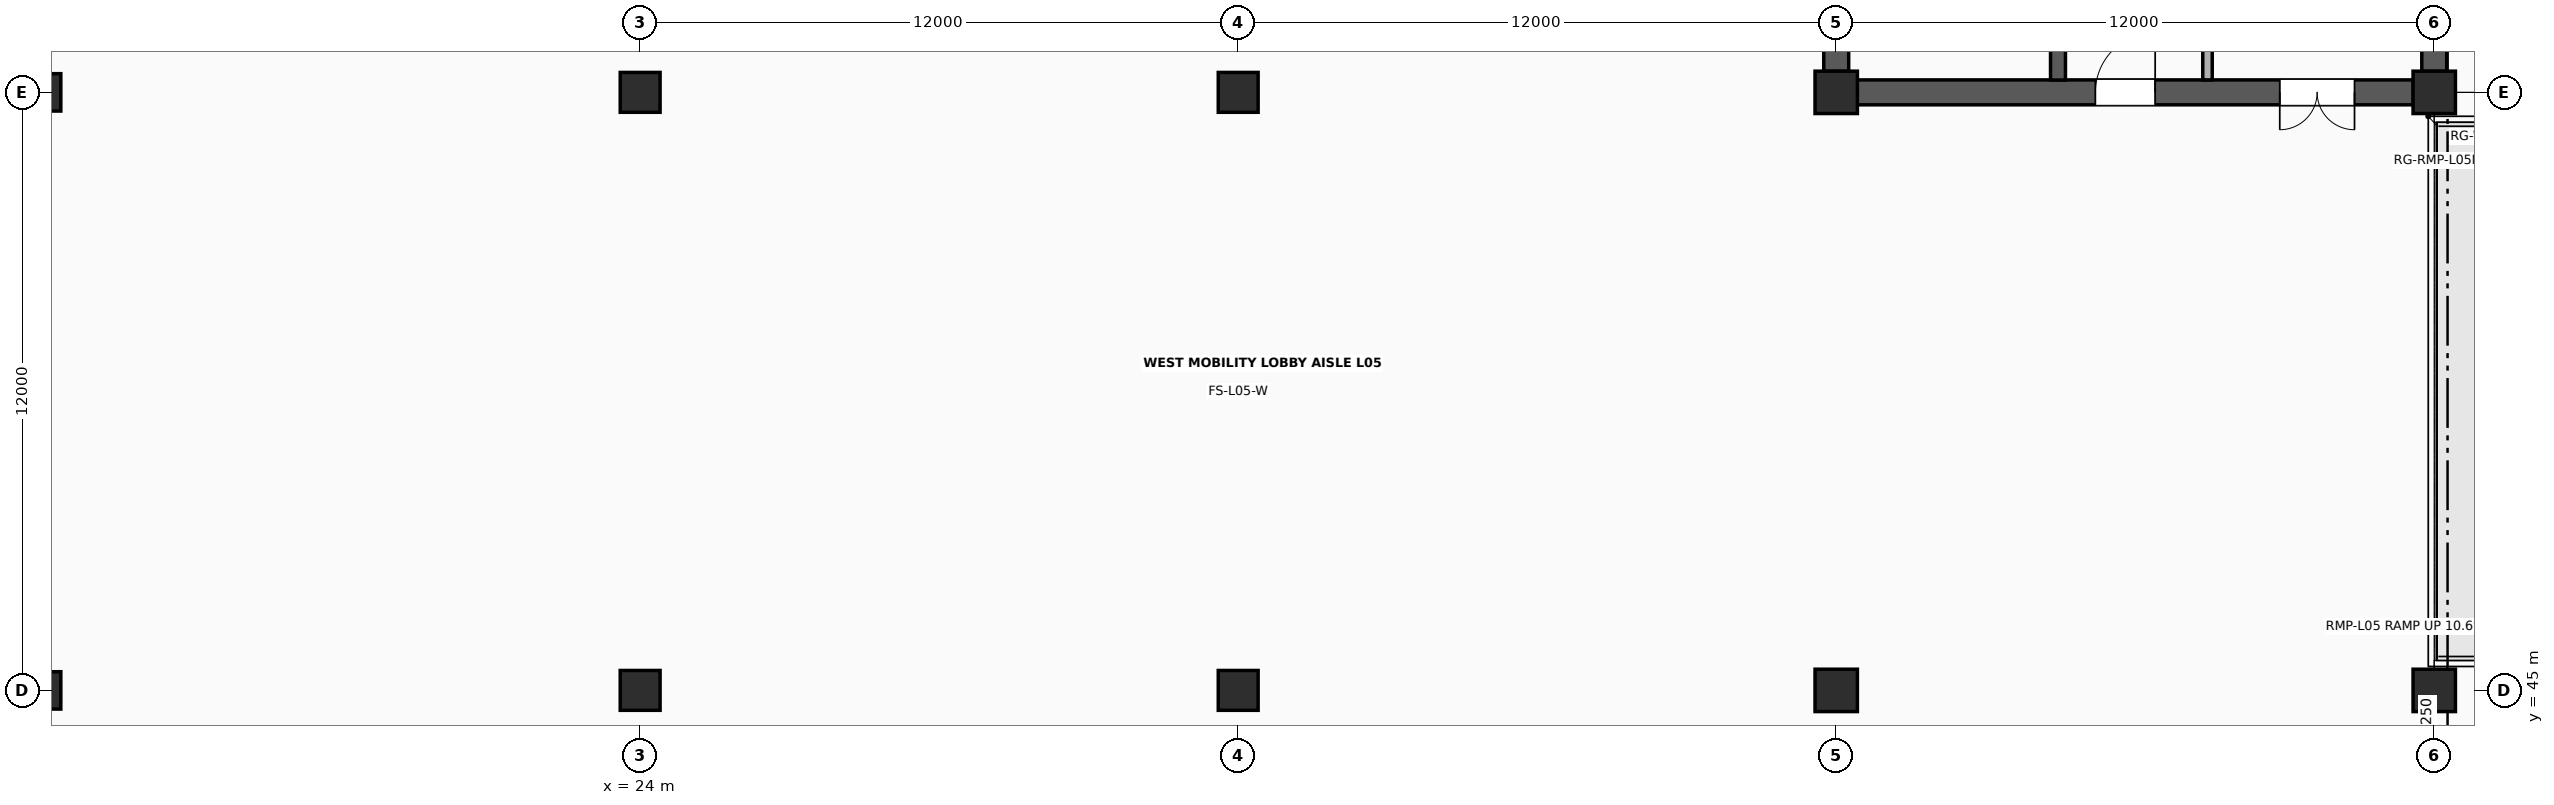
"""IFC4 building model, lengths in metres.
Left out: names, types, materials, properties, quantities, classifications, styles, units other than length and angle.
Written with IfcOpenShell. Run it as: python <this file> out.ifc"""

import sys

from ifc_helpers import new_model, si_unit, direction, frame, frame_2d, origin, origin_2d, place, context, subcontext, project, spatial, rectangle, extrude, element, fill, save


model = new_model("IFC4")
c1 = context("Model", 3, precision=1e-05, world=origin(), true_north=direction((0.0, 1.0)))
c2 = subcontext(c1, "Body", "Model", "MODEL_VIEW")
j1 = project(units=[si_unit("LENGTHUNIT", "METRE"), si_unit("PLANEANGLEUNIT", "RADIAN")], contexts=[c1])
p1 = place(None, origin())
s1 = spatial("IfcSite", under=j1, at=p1, CompositionType="ELEMENT")
p2 = place(p1, origin())
s2 = spatial("IfcBuilding", under=s1, at=p2, CompositionType="ELEMENT")
p3 = place(p2, frame((0.0, 0.0, 21.0)))
s3 = spatial("IfcBuildingStorey", under=s2, at=p3, CompositionType="ELEMENT", Elevation=21.0)
for number, where, z_axis, x_axis in (
    (1, (12.0, 45.0, 0.0), (0.0, 0.0, 1.0), (1.0, 0.0, 0.0)),
    (2, (12.0, 57.0, 0.0), (0.0, 0.0, 1.0), (1.0, 0.0, 0.0)),
):
    element("IfcColumn", number, at=place(p3, frame(where, z_axis=z_axis, x_axis=x_axis)), inside=s3, PredefinedType="COLUMN", context=c2, shape_type="SweptSolid", body=[
        extrude(rectangle(XDim=0.75, YDim=0.75, at=origin_2d()), origin(), (0.0, 0.0, 1.0), 3.8),
    ])
for number, where, z_axis, x_axis in (
    (3, (24.0, 45.0, 0.0), (0.0, 0.0, 1.0), (1.0, 0.0, 0.0)),
    (4, (24.0, 57.0, 0.0), (0.0, 0.0, 1.0), (1.0, 0.0, 0.0)),
    (5, (36.0, 45.0, 0.0), (0.0, 0.0, 1.0), (1.0, 0.0, 0.0)),
    (6, (36.0, 57.0, 0.0), (0.0, 0.0, 1.0), (1.0, 0.0, 0.0)),
):
    element("IfcColumn", number, at=place(p3, frame(where, z_axis=z_axis, x_axis=x_axis)), inside=s3, PredefinedType="COLUMN", context=c2, shape_type="SweptSolid", body=[
        extrude(rectangle(XDim=0.8, YDim=0.8, at=origin_2d()), origin(), (0.0, 0.0, 1.0), 3.8),
    ])
for number, where, z_axis, x_axis in (
    (7, (48.0, 45.0, 0.0), (0.0, 0.0, 1.0), (1.0, 0.0, 0.0)),
    (8, (48.0, 57.0, 0.0), (0.0, 0.0, 1.0), (1.0, 0.0, 0.0)),
    (9, (60.0, 45.0, 0.0), (0.0, 0.0, 1.0), (1.0, 0.0, 0.0)),
    (10, (60.0, 57.0, 0.0), (0.0, 0.0, 1.0), (1.0, 0.0, 0.0)),
):
    element("IfcColumn", number, at=place(p3, frame(where, z_axis=z_axis, x_axis=x_axis)), inside=s3, PredefinedType="COLUMN", context=c2, shape_type="SweptSolid", body=[
        extrude(rectangle(XDim=0.85, YDim=0.85, at=origin_2d()), origin(), (0.0, 0.0, 1.0), 3.8),
    ])
p4 = place(p3, frame((48.422, 57.0, 0.0), z_axis=(0.0, 0.0, 1.0), x_axis=(1.0, 0.0, 0.0)))
e11 = element("IfcWall", 11, at=p4, inside=s3, PredefinedType="SHEAR", context=c2, shape_type="SweptSolid", body=[
    extrude(rectangle(XDim=11.156, YDim=0.5, at=frame_2d((5.578, 0.0))), origin(), (0.0, 0.0, 1.0), 3.638),
])
p5 = place(p4, frame((4.778, 0.0, 0.0)))
e12 = element("IfcOpeningElement", 12, at=p5, cuts=e11, PredefinedType="OPENING", context=c2, shape_type="SweptSolid", body=[
    extrude(rectangle(XDim=1.2, YDim=2.2, at=frame_2d((0.6, 1.1))), frame((0.0, 0.265, 0.0), z_axis=(0.0, -1.0, 0.0), x_axis=(1.0, 0.0, 0.0)), (0.0, 0.0, 1.0), 0.53),
])
p6 = place(p4, frame((8.478, 0.0, 0.0)))
e13 = element("IfcOpeningElement", 13, at=p6, cuts=e11, PredefinedType="OPENING", context=c2, shape_type="SweptSolid", body=[
    extrude(rectangle(XDim=1.5, YDim=2.25, at=frame_2d((0.75, 1.125))), frame((0.0, 0.265, 0.0), z_axis=(0.0, -1.0, 0.0), x_axis=(1.0, 0.0, 0.0)), (0.0, 0.0, 1.0), 0.53),
])
for number, where, z_axis, x_axis in (
    (14, (48.0, 57.422, 0.0), (0.0, 0.0, 1.0), (0.0, 1.0, 0.0)),
    (15, (60.0, 57.422, 0.0), (0.0, 0.0, 1.0), (0.0, 1.0, 0.0)),
):
    element("IfcWall", number, at=place(p3, frame(where, z_axis=z_axis, x_axis=x_axis)), inside=s3, PredefinedType="SHEAR", context=c2, shape_type="SweptSolid", body=[
        extrude(rectangle(XDim=11.156, YDim=0.5, at=frame_2d((5.578, 0.0))), origin(), (0.0, 0.0, 1.0), 3.638),
    ])
p7 = place(p3, frame((52.45, 57.247, 0.0), z_axis=(0.0, 0.0, 1.0), x_axis=(0.0, 1.0, 0.0)))
e16 = element("IfcWall", 16, at=p7, inside=s3, PredefinedType="SHEAR", context=c2, shape_type="SweptSolid", body=[
    extrude(rectangle(XDim=11.506, YDim=0.3, at=frame_2d((5.753, 0.0))), origin(), (0.0, 0.0, 1.0), 3.638),
])
p8 = place(p7, frame((0.9, 0.0, 0.0)))
e17 = element("IfcOpeningElement", 17, at=p8, cuts=e16, PredefinedType="OPENING", context=c2, shape_type="SweptSolid", body=[
    extrude(rectangle(XDim=1.1, YDim=2.2, at=frame_2d((0.55, 1.1))), frame((0.0, 0.165, 0.0), z_axis=(0.0, -1.0, 0.0), x_axis=(1.0, 0.0, 0.0)), (0.0, 0.0, 1.0), 0.33),
])
p9 = place(p3, frame((55.45, 57.25, 0.0), z_axis=(0.0, 0.0, 1.0), x_axis=(0.0, 1.0, 0.0)))
e18 = element("IfcWall", 18, at=p9, inside=s3, PredefinedType="SOLIDWALL", context=c2, shape_type="SweptSolid", body=[
    extrude(rectangle(XDim=8.43, YDim=0.19, at=frame_2d((4.215, 0.0))), origin(), (0.0, 0.0, 1.0), 3.628),
])
p10 = place(p9, frame((3.6, 0.0, 0.0)))
e19 = element("IfcOpeningElement", 19, at=p10, cuts=e18, PredefinedType="OPENING", context=c2, shape_type="SweptSolid", body=[
    extrude(rectangle(XDim=1.04, YDim=2.18, at=frame_2d((0.52, 1.09))), frame((0.0, 0.11, 0.0), z_axis=(0.0, -1.0, 0.0), x_axis=(1.0, 0.0, 0.0)), (0.0, 0.0, 1.0), 0.22),
])
p11 = place(p5, origin())
e20 = element("IfcDoor", 20, at=p11, inside=s3, OperationType="SINGLE_SWING_RIGHT", PredefinedType="DOOR", context=c2, shape_type="SweptSolid", body=[
    extrude(rectangle(XDim=1.2, YDim=2.2, at=frame_2d((0.6, 1.1))), frame((0.0, 0.025, 0.0), z_axis=(0.0, -1.0, 0.0), x_axis=(1.0, 0.0, 0.0)), (0.0, 0.0, 1.0), 0.05),
])
fill(e12, e20)
p12 = place(p6, origin())
e21 = element("IfcDoor", 21, at=p12, inside=s3, OperationType="DOUBLE_DOOR_SINGLE_SWING", PredefinedType="DOOR", context=c2, shape_type="SweptSolid", body=[
    extrude(rectangle(XDim=1.5, YDim=2.25, at=frame_2d((0.75, 1.125))), frame((0.0, 0.025, 0.0), z_axis=(0.0, -1.0, 0.0), x_axis=(1.0, 0.0, 0.0)), (0.0, 0.0, 1.0), 0.05),
])
fill(e13, e21)
save(model, sys.argv[1])
